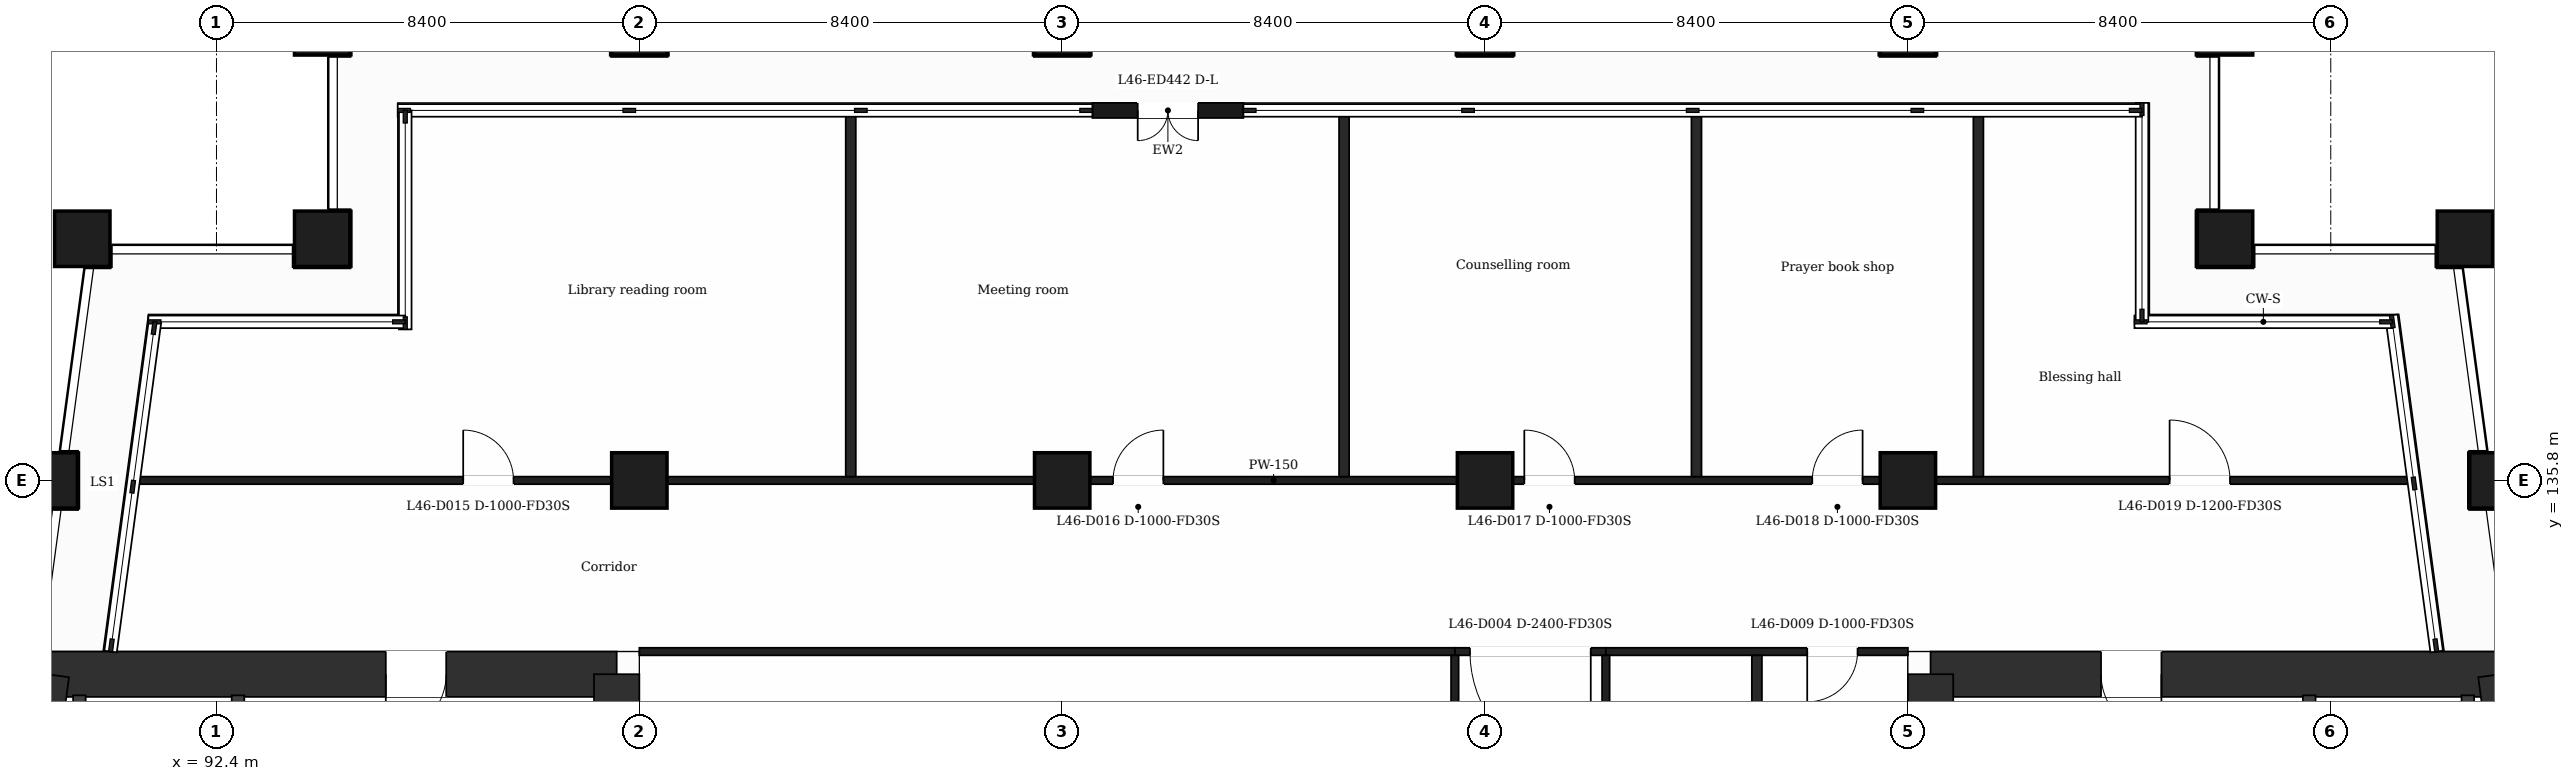
"""IFC4 building model, lengths in metres.
Left out: names, types, materials, properties, quantities, classifications, styles, units other than length and angle.
Written with IfcOpenShell. Run it as: python <this file> out.ifc"""

import sys

from ifc_helpers import new_model, si_unit, direction, frame, frame_2d, origin, origin_2d, place, context, subcontext, project, spatial, rectangle, extrude, element, fill, save


model = new_model("IFC4")
c1 = context("Model", 3, precision=1e-05, world=origin(), true_north=direction((0.0, 1.0)))
c2 = subcontext(c1, "Body", "Model", "MODEL_VIEW")
j1 = project(units=[si_unit("LENGTHUNIT", "METRE"), si_unit("PLANEANGLEUNIT", "RADIAN")], contexts=[c1])
p1 = place(None, origin())
s1 = spatial("IfcSite", under=j1, at=p1, CompositionType="ELEMENT")
p2 = place(p1, origin())
s2 = spatial("IfcBuilding", under=s1, at=p2, CompositionType="ELEMENT")
p3 = place(p2, frame((0.0, 0.0, 192.2)))
s3 = spatial("IfcBuildingStorey", under=s2, at=p3, CompositionType="ELEMENT", Elevation=192.2)
p4 = place(p3, frame((89.024, 131.95, 0.0), z_axis=(0.0, 0.0, 1.0), x_axis=(1.0, 0.0, 0.0)))
e1 = element("IfcWall", 1, at=p4, inside=s3, PredefinedType="SHEAR", context=c2, shape_type="SweptSolid", body=[
    extrude(rectangle(XDim=11.326, YDim=0.9, at=frame_2d((5.663, 0.0))), origin(), (0.0, 0.0, 1.0), 5.0),
])
p5 = place(p4, frame((6.739, 0.0, 0.0)))
e2 = element("IfcOpeningElement", 2, at=p5, cuts=e1, PredefinedType="OPENING", context=c2, shape_type="SweptSolid", body=[
    extrude(rectangle(XDim=1.2, YDim=2.1, at=frame_2d((0.6, 1.05))), frame((0.0, 0.46, 0.0), z_axis=(0.0, -1.0, 0.0), x_axis=(1.0, 0.0, 0.0)), (0.0, 0.0, 1.0), 0.92),
])
p6 = place(p3, frame((100.35, 131.95, 0.0), z_axis=(0.0, 0.0, 1.0), x_axis=(0.0, -1.0, 0.0)))
e3 = element("IfcWall", 3, at=p6, inside=s3, PredefinedType="SHEAR", context=c2, shape_type="SweptSolid", body=[
    extrude(rectangle(XDim=21.1, YDim=0.9, at=frame_2d((10.55, 0.0))), origin(), (0.0, 0.0, 1.0), 5.0),
])
p7 = place(p6, frame((7.8, 0.0, 0.0)))
e4 = element("IfcOpeningElement", 4, at=p7, cuts=e3, PredefinedType="OPENING", context=c2, shape_type="SweptSolid", body=[
    extrude(rectangle(XDim=1.4, YDim=2.1, at=frame_2d((0.7, 1.05))), frame((0.0, 0.46, 0.0), z_axis=(0.0, -1.0, 0.0), x_axis=(1.0, 0.0, 0.0)), (0.0, 0.0, 1.0), 0.92),
])
p8 = place(p3, frame((86.184, 110.85, 0.0), z_axis=(0.0, 0.0, 1.0), x_axis=(0.133410495943, 0.991060865725, 0.0)))
e5 = element("IfcWall", 5, at=p8, inside=s3, PredefinedType="SHEAR", context=c2, shape_type="SweptSolid", body=[
    extrude(rectangle(XDim=21.29, YDim=0.9, at=frame_2d((10.645, 0.0))), origin(), (0.0, 0.0, 1.0), 5.0),
])
p9 = place(p3, frame((126.45, 131.95, 0.0), z_axis=(0.0, 0.0, 1.0), x_axis=(1.0, 0.0, 0.0)))
e6 = element("IfcWall", 6, at=p9, inside=s3, PredefinedType="SHEAR", context=c2, shape_type="SweptSolid", body=[
    extrude(rectangle(XDim=11.326, YDim=0.9, at=frame_2d((5.663, 0.0))), origin(), (0.0, 0.0, 1.0), 5.0),
])
p10 = place(p9, frame((3.386, 0.0, 0.0)))
e7 = element("IfcOpeningElement", 7, at=p10, cuts=e6, PredefinedType="OPENING", context=c2, shape_type="SweptSolid", body=[
    extrude(rectangle(XDim=1.2, YDim=2.1, at=frame_2d((0.6, 1.05))), frame((0.0, 0.46, 0.0), z_axis=(0.0, -1.0, 0.0), x_axis=(1.0, 0.0, 0.0)), (0.0, 0.0, 1.0), 0.92),
])
p11 = place(p3, frame((137.776, 131.95, 0.0), z_axis=(0.0, 0.0, 1.0), x_axis=(0.133421759112, -0.991059349482, 0.0)))
e8 = element("IfcWall", 8, at=p11, inside=s3, PredefinedType="SHEAR", context=c2, shape_type="SweptSolid", body=[
    extrude(rectangle(XDim=21.29, YDim=0.9, at=frame_2d((10.645, 0.0))), origin(), (0.0, 0.0, 1.0), 5.0),
])
p12 = place(p3, frame((126.45, 110.85, 0.0), z_axis=(0.0, 0.0, 1.0), x_axis=(0.0, 1.0, 0.0)))
e9 = element("IfcWall", 9, at=p12, inside=s3, PredefinedType="SHEAR", context=c2, shape_type="SweptSolid", body=[
    extrude(rectangle(XDim=21.1, YDim=0.9, at=frame_2d((10.55, 0.0))), origin(), (0.0, 0.0, 1.0), 5.0),
])
p13 = place(p12, frame((11.9, 0.0, 0.0)))
e10 = element("IfcOpeningElement", 10, at=p13, cuts=e9, PredefinedType="OPENING", context=c2, shape_type="SweptSolid", body=[
    extrude(rectangle(XDim=1.4, YDim=2.1, at=frame_2d((0.7, 1.05))), frame((0.0, 0.46, 0.0), z_axis=(0.0, -1.0, 0.0), x_axis=(1.0, 0.0, 0.0)), (0.0, 0.0, 1.0), 0.92),
])
for number, where, z_axis, x_axis in (
    (11, (94.5, 140.6, 0.0), (0.0, 0.0, 1.0), (1.0, 0.0, 0.0)),
    (12, (132.3, 140.6, 0.0), (0.0, 0.0, 1.0), (1.0, 0.0, 0.0)),
    (13, (89.735, 140.6, 0.0), (0.0, 0.0, 1.0), (1.0, 0.0, 0.0)),
    (14, (137.065, 140.6, 0.0), (0.0, 0.0, 1.0), (1.0, 0.0, 0.0)),
    (15, (100.8, 135.8, 0.0), (0.0, 0.0, 1.0), (1.0, 0.0, 0.0)),
    (16, (109.2, 135.8, 0.0), (0.0, 0.0, 1.0), (1.0, 0.0, 0.0)),
    (17, (117.6, 135.8, 0.0), (0.0, 0.0, 1.0), (1.0, 0.0, 0.0)),
    (18, (126.0, 135.8, 0.0), (0.0, 0.0, 1.0), (1.0, 0.0, 0.0)),
    (19, (89.088, 135.8, 0.0), (0.0, 0.0, 1.0), (1.0, 0.0, 0.0)),
    (20, (137.711, 135.8, 0.0), (0.0, 0.0, 1.0), (1.0, 0.0, 0.0)),
    (21, (100.8, 144.8, 0.0), (0.0, 0.0, 1.0), (1.0, 0.0, 0.0)),
    (22, (109.2, 144.8, 0.0), (0.0, 0.0, 1.0), (1.0, 0.0, 0.0)),
    (23, (117.6, 144.8, 0.0), (0.0, 0.0, 1.0), (1.0, 0.0, 0.0)),
    (24, (126.0, 144.8, 0.0), (0.0, 0.0, 1.0), (1.0, 0.0, 0.0)),
    (25, (94.5, 144.8, 0.0), (0.0, 0.0, 1.0), (1.0, 0.0, 0.0)),
    (26, (132.3, 144.8, 0.0), (0.0, 0.0, 1.0), (1.0, 0.0, 0.0)),
):
    element("IfcColumn", number, at=place(p3, frame(where, z_axis=z_axis, x_axis=x_axis)), inside=s3, PredefinedType="COLUMN", context=c2, shape_type="SweptSolid", body=[
        extrude(rectangle(XDim=1.1, YDim=1.1, at=origin_2d()), origin(), (0.0, 0.0, 1.0), 5.0),
    ])
p14 = place(p3, frame((112.8, 143.15, 0.0), z_axis=(0.0, 0.0, 1.0), x_axis=(-1.0, 0.0, 0.0)))
e27 = element("IfcWall", 27, at=p14, inside=s3, PredefinedType="SOLIDWALL", context=c2, shape_type="SweptSolid", body=[
    extrude(rectangle(XDim=3.0, YDim=0.3, at=frame_2d((1.5, 0.0))), origin(), (0.0, 0.0, 1.0), 4.5),
])
p15 = place(p14, frame((0.9, 0.0, 0.0)))
e28 = element("IfcOpeningElement", 28, at=p15, cuts=e27, PredefinedType="OPENING", context=c2, shape_type="SweptSolid", body=[
    extrude(rectangle(XDim=1.2, YDim=2.4, at=frame_2d((0.6, 1.2))), frame((0.0, 0.16, 0.0), z_axis=(0.0, -1.0, 0.0), x_axis=(1.0, 0.0, 0.0)), (0.0, 0.0, 1.0), 0.32),
])
p16 = place(p3, frame((117.0, 132.4, 0.0), z_axis=(0.0, 0.0, 1.0), x_axis=(1.0, 0.0, 0.0)))
e29 = element("IfcWall", 29, at=p16, inside=s3, PredefinedType="PARTITIONING", context=c2, shape_type="SweptSolid", body=[
    extrude(rectangle(XDim=3.0, YDim=0.15, at=frame_2d((1.5, 0.0))), origin(), (0.0, 0.0, 1.0), 4.5),
])
p17 = place(p16, frame((0.3, 0.0, 0.0)))
e30 = element("IfcOpeningElement", 30, at=p17, cuts=e29, PredefinedType="OPENING", context=c2, shape_type="SweptSolid", body=[
    extrude(rectangle(XDim=2.4, YDim=2.1, at=frame_2d((1.2, 1.05))), frame((0.0, 0.085, 0.0), z_axis=(0.0, -1.0, 0.0), x_axis=(1.0, 0.0, 0.0)), (0.0, 0.0, 1.0), 0.17),
])
p18 = place(p3, frame((100.8, 132.4, 0.0), z_axis=(0.0, 0.0, 1.0), x_axis=(1.0, 0.0, 0.0)))
e31 = element("IfcWall", 31, at=p18, inside=s3, PredefinedType="PARTITIONING", context=c2, shape_type="SweptSolid", body=[
    extrude(rectangle(XDim=16.2, YDim=0.15, at=frame_2d((8.1, 0.0))), origin(), (0.0, 0.0, 1.0), 4.5),
])
p19 = place(p3, frame((120.0, 132.4, 0.0), z_axis=(0.0, 0.0, 1.0), x_axis=(1.0, 0.0, 0.0)))
e32 = element("IfcWall", 32, at=p19, inside=s3, PredefinedType="PARTITIONING", context=c2, shape_type="SweptSolid", body=[
    extrude(rectangle(XDim=6.0, YDim=0.15, at=frame_2d((3.0, 0.0))), origin(), (0.0, 0.0, 1.0), 4.5),
])
p20 = place(p19, frame((4.0, 0.0, 0.0)))
e33 = element("IfcOpeningElement", 33, at=p20, cuts=e32, PredefinedType="OPENING", context=c2, shape_type="SweptSolid", body=[
    extrude(rectangle(XDim=1.0, YDim=2.1, at=frame_2d((0.5, 1.05))), frame((0.0, 0.085, 0.0), z_axis=(0.0, -1.0, 0.0), x_axis=(1.0, 0.0, 0.0)), (0.0, 0.0, 1.0), 0.17),
])
p21 = place(p3, frame((90.864, 135.8, 0.0), z_axis=(0.0, 0.0, 1.0), x_axis=(1.0, 0.0, 0.0)))
e34 = element("IfcWall", 34, at=p21, inside=s3, PredefinedType="PARTITIONING", context=c2, shape_type="SweptSolid", body=[
    extrude(rectangle(XDim=45.072, YDim=0.15, at=frame_2d((22.536, 0.0))), origin(), (0.0, 0.0, 1.0), 4.5),
])
p22 = place(p21, frame((6.437, 0.0, 0.0)))
e35 = element("IfcOpeningElement", 35, at=p22, cuts=e34, PredefinedType="OPENING", context=c2, shape_type="SweptSolid", body=[
    extrude(rectangle(XDim=1.0, YDim=2.1, at=frame_2d((0.5, 1.05))), frame((0.0, 0.085, 0.0), z_axis=(0.0, -1.0, 0.0), x_axis=(1.0, 0.0, 0.0)), (0.0, 0.0, 1.0), 0.17),
])
p23 = place(p21, frame((19.346, 0.0, 0.0)))
e36 = element("IfcOpeningElement", 36, at=p23, cuts=e34, PredefinedType="OPENING", context=c2, shape_type="SweptSolid", body=[
    extrude(rectangle(XDim=1.0, YDim=2.1, at=frame_2d((0.5, 1.05))), frame((0.0, 0.085, 0.0), z_axis=(0.0, -1.0, 0.0), x_axis=(1.0, 0.0, 0.0)), (0.0, 0.0, 1.0), 0.17),
])
p24 = place(p21, frame((27.516, 0.0, 0.0)))
e37 = element("IfcOpeningElement", 37, at=p24, cuts=e34, PredefinedType="OPENING", context=c2, shape_type="SweptSolid", body=[
    extrude(rectangle(XDim=1.0, YDim=2.1, at=frame_2d((0.5, 1.05))), frame((0.0, 0.085, 0.0), z_axis=(0.0, -1.0, 0.0), x_axis=(1.0, 0.0, 0.0)), (0.0, 0.0, 1.0), 0.17),
])
p25 = place(p21, frame((33.236, 0.0, 0.0)))
e38 = element("IfcOpeningElement", 38, at=p25, cuts=e34, PredefinedType="OPENING", context=c2, shape_type="SweptSolid", body=[
    extrude(rectangle(XDim=1.0, YDim=2.1, at=frame_2d((0.5, 1.05))), frame((0.0, 0.085, 0.0), z_axis=(0.0, -1.0, 0.0), x_axis=(1.0, 0.0, 0.0)), (0.0, 0.0, 1.0), 0.17),
])
p26 = place(p21, frame((40.335, 0.0, 0.0)))
e39 = element("IfcOpeningElement", 39, at=p26, cuts=e34, PredefinedType="OPENING", context=c2, shape_type="SweptSolid", body=[
    extrude(rectangle(XDim=1.2, YDim=2.1, at=frame_2d((0.6, 1.05))), frame((0.0, 0.085, 0.0), z_axis=(0.0, -1.0, 0.0), x_axis=(1.0, 0.0, 0.0)), (0.0, 0.0, 1.0), 0.17),
])
p27 = place(p3, frame((89.677, 124.575, 0.0), z_axis=(0.0, 0.0, 1.0), x_axis=(0.0, 1.0, 0.0)))
e40 = element("IfcWall", 40, at=p27, inside=s3, PredefinedType="PARTITIONING", context=c2, shape_type="SweptSolid", body=[
    extrude(rectangle(XDim=6.955, YDim=0.25, at=frame_2d((3.478, 0.0))), origin(), (0.0, 0.0, 1.0), 4.5),
])
p28 = place(p3, frame((92.827, 124.575, 0.0), z_axis=(0.0, 0.0, 1.0), x_axis=(0.0, 1.0, 0.0)))
e41 = element("IfcWall", 41, at=p28, inside=s3, PredefinedType="PARTITIONING", context=c2, shape_type="SweptSolid", body=[
    extrude(rectangle(XDim=6.955, YDim=0.25, at=frame_2d((3.478, 0.0))), origin(), (0.0, 0.0, 1.0), 4.5),
])
p29 = place(p28, frame((5.325, 0.0, 0.0)))
e42 = element("IfcOpeningElement", 42, at=p29, cuts=e41, PredefinedType="OPENING", context=c2, shape_type="SweptSolid", body=[
    extrude(rectangle(XDim=1.0, YDim=2.1, at=frame_2d((0.5, 1.05))), frame((0.0, 0.135, 0.0), z_axis=(0.0, -1.0, 0.0), x_axis=(1.0, 0.0, 0.0)), (0.0, 0.0, 1.0), 0.27),
])
for number, where, z_axis, x_axis in (
    (43, (105.0, 135.875, 0.0), (0.0, 0.0, 1.0), (0.0, 1.0, 0.0)),
    (44, (114.8, 135.875, 0.0), (0.0, 0.0, 1.0), (0.0, 1.0, 0.0)),
):
    element("IfcWall", number, at=place(p3, frame(where, z_axis=z_axis, x_axis=x_axis)), inside=s3, PredefinedType="PARTITIONING", context=c2, shape_type="SweptSolid", body=[
        extrude(rectangle(XDim=7.165, YDim=0.2, at=frame_2d((3.583, 0.0))), origin(), (0.0, 0.0, 1.0), 4.5),
    ])
p30 = place(p3, frame((117.0, 125.875, 0.0), z_axis=(0.0, 0.0, 1.0), x_axis=(0.0, 1.0, 0.0)))
e45 = element("IfcWall", 45, at=p30, inside=s3, PredefinedType="PARTITIONING", context=c2, shape_type="SweptSolid", body=[
    extrude(rectangle(XDim=6.45, YDim=0.15, at=frame_2d((3.225, 0.0))), origin(), (0.0, 0.0, 1.0), 4.5),
])
p31 = place(p3, frame((120.0, 125.875, 0.0), z_axis=(0.0, 0.0, 1.0), x_axis=(0.0, 1.0, 0.0)))
e46 = element("IfcWall", 46, at=p31, inside=s3, PredefinedType="PARTITIONING", context=c2, shape_type="SweptSolid", body=[
    extrude(rectangle(XDim=6.45, YDim=0.15, at=frame_2d((3.225, 0.0))), origin(), (0.0, 0.0, 1.0), 4.5),
])
p32 = place(p31, frame((2.725, 0.0, 0.0)))
e47 = element("IfcOpeningElement", 47, at=p32, cuts=e46, PredefinedType="OPENING", context=c2, shape_type="SweptSolid", body=[
    extrude(rectangle(XDim=1.0, YDim=2.1, at=frame_2d((0.5, 1.05))), frame((0.0, 0.085, 0.0), z_axis=(0.0, -1.0, 0.0), x_axis=(1.0, 0.0, 0.0)), (0.0, 0.0, 1.0), 0.17),
])
p33 = place(p3, frame((121.8, 135.875, 0.0), z_axis=(0.0, 0.0, 1.0), x_axis=(0.0, 1.0, 0.0)))
e48 = element("IfcWall", 48, at=p33, inside=s3, PredefinedType="PARTITIONING", context=c2, shape_type="SweptSolid", body=[
    extrude(rectangle(XDim=7.165, YDim=0.2, at=frame_2d((3.583, 0.0))), origin(), (0.0, 0.0, 1.0), 4.5),
])
p34 = place(p3, frame((123.0, 125.9, 0.0), z_axis=(0.0, 0.0, 1.0), x_axis=(0.0, 1.0, 0.0)))
e49 = element("IfcWall", 49, at=p34, inside=s3, PredefinedType="PARTITIONING", context=c2, shape_type="SweptSolid", body=[
    extrude(rectangle(XDim=6.425, YDim=0.2, at=frame_2d((3.212, 0.0))), origin(), (0.0, 0.0, 1.0), 4.5),
])
p35 = place(p3, frame((127.4, 135.875, 0.0), z_axis=(0.0, 0.0, 1.0), x_axis=(0.0, 1.0, 0.0)))
e50 = element("IfcWall", 50, at=p35, inside=s3, PredefinedType="PARTITIONING", context=c2, shape_type="SweptSolid", body=[
    extrude(rectangle(XDim=7.165, YDim=0.2, at=frame_2d((3.583, 0.0))), origin(), (0.0, 0.0, 1.0), 4.5),
])
p36 = place(p3, frame((133.973, 124.575, 0.0), z_axis=(0.0, 0.0, 1.0), x_axis=(0.0, 1.0, 0.0)))
e51 = element("IfcWall", 51, at=p36, inside=s3, PredefinedType="PARTITIONING", context=c2, shape_type="SweptSolid", body=[
    extrude(rectangle(XDim=6.955, YDim=0.25, at=frame_2d((3.478, 0.0))), origin(), (0.0, 0.0, 1.0), 4.5),
])
p37 = place(p36, frame((5.325, 0.0, 0.0)))
e52 = element("IfcOpeningElement", 52, at=p37, cuts=e51, PredefinedType="OPENING", context=c2, shape_type="SweptSolid", body=[
    extrude(rectangle(XDim=1.0, YDim=2.1, at=frame_2d((0.5, 1.05))), frame((0.0, 0.135, 0.0), z_axis=(0.0, -1.0, 0.0), x_axis=(1.0, 0.0, 0.0)), (0.0, 0.0, 1.0), 0.27),
])
p38 = place(p3, frame((137.123, 124.575, 0.0), z_axis=(0.0, 0.0, 1.0), x_axis=(0.0, 1.0, 0.0)))
e53 = element("IfcWall", 53, at=p38, inside=s3, PredefinedType="PARTITIONING", context=c2, shape_type="SweptSolid", body=[
    extrude(rectangle(XDim=6.955, YDim=0.25, at=frame_2d((3.478, 0.0))), origin(), (0.0, 0.0, 1.0), 4.5),
])
p39 = place(p15, origin())
e54 = element("IfcDoor", 54, at=p39, inside=s3, OperationType="DOUBLE_DOOR_SINGLE_SWING", PredefinedType="DOOR", context=c2, shape_type="SweptSolid", body=[
    extrude(rectangle(XDim=1.2, YDim=2.4, at=frame_2d((0.6, 1.2))), frame((0.0, 0.025, 0.0), z_axis=(0.0, -1.0, 0.0), x_axis=(1.0, 0.0, 0.0)), (0.0, 0.0, 1.0), 0.05),
])
fill(e28, e54)
p40 = place(p17, origin())
e55 = element("IfcDoor", 55, at=p40, inside=s3, OperationType="SINGLE_SWING_RIGHT", PredefinedType="DOOR", context=c2, shape_type="SweptSolid", body=[
    extrude(rectangle(XDim=2.4, YDim=2.1, at=frame_2d((1.2, 1.05))), frame((0.0, 0.025, 0.0), z_axis=(0.0, -1.0, 0.0), x_axis=(1.0, 0.0, 0.0)), (0.0, 0.0, 1.0), 0.05),
])
fill(e30, e55)
p41 = place(p20, origin())
e56 = element("IfcDoor", 56, at=p41, inside=s3, OperationType="SINGLE_SWING_LEFT", PredefinedType="DOOR", context=c2, shape_type="SweptSolid", body=[
    extrude(rectangle(XDim=1.0, YDim=2.1, at=frame_2d((0.5, 1.05))), frame((0.0, 0.025, 0.0), z_axis=(0.0, -1.0, 0.0), x_axis=(1.0, 0.0, 0.0)), (0.0, 0.0, 1.0), 0.05),
])
fill(e33, e56)
p42 = place(p22, origin())
e57 = element("IfcDoor", 57, at=p42, inside=s3, OperationType="SINGLE_SWING_LEFT", PredefinedType="DOOR", context=c2, shape_type="SweptSolid", body=[
    extrude(rectangle(XDim=1.0, YDim=2.1, at=frame_2d((0.5, 1.05))), frame((0.0, 0.025, 0.0), z_axis=(0.0, -1.0, 0.0), x_axis=(1.0, 0.0, 0.0)), (0.0, 0.0, 1.0), 0.05),
])
fill(e35, e57)
p43 = place(p23, origin())
e58 = element("IfcDoor", 58, at=p43, inside=s3, OperationType="SINGLE_SWING_RIGHT", PredefinedType="DOOR", context=c2, shape_type="SweptSolid", body=[
    extrude(rectangle(XDim=1.0, YDim=2.1, at=frame_2d((0.5, 1.05))), frame((0.0, 0.025, 0.0), z_axis=(0.0, -1.0, 0.0), x_axis=(1.0, 0.0, 0.0)), (0.0, 0.0, 1.0), 0.05),
])
fill(e36, e58)
p44 = place(p24, origin())
e59 = element("IfcDoor", 59, at=p44, inside=s3, OperationType="SINGLE_SWING_LEFT", PredefinedType="DOOR", context=c2, shape_type="SweptSolid", body=[
    extrude(rectangle(XDim=1.0, YDim=2.1, at=frame_2d((0.5, 1.05))), frame((0.0, 0.025, 0.0), z_axis=(0.0, -1.0, 0.0), x_axis=(1.0, 0.0, 0.0)), (0.0, 0.0, 1.0), 0.05),
])
fill(e37, e59)
p45 = place(p25, origin())
e60 = element("IfcDoor", 60, at=p45, inside=s3, OperationType="SINGLE_SWING_RIGHT", PredefinedType="DOOR", context=c2, shape_type="SweptSolid", body=[
    extrude(rectangle(XDim=1.0, YDim=2.1, at=frame_2d((0.5, 1.05))), frame((0.0, 0.025, 0.0), z_axis=(0.0, -1.0, 0.0), x_axis=(1.0, 0.0, 0.0)), (0.0, 0.0, 1.0), 0.05),
])
fill(e38, e60)
p46 = place(p26, origin())
e61 = element("IfcDoor", 61, at=p46, inside=s3, OperationType="SINGLE_SWING_LEFT", PredefinedType="DOOR", context=c2, shape_type="SweptSolid", body=[
    extrude(rectangle(XDim=1.2, YDim=2.1, at=frame_2d((0.6, 1.05))), frame((0.0, 0.025, 0.0), z_axis=(0.0, -1.0, 0.0), x_axis=(1.0, 0.0, 0.0)), (0.0, 0.0, 1.0), 0.05),
])
fill(e39, e61)
p47 = place(p5, origin())
e62 = element("IfcDoor", 62, at=p47, inside=s3, OperationType="SINGLE_SWING_LEFT", PredefinedType="DOOR", context=c2, shape_type="SweptSolid", body=[
    extrude(rectangle(XDim=1.2, YDim=2.1, at=frame_2d((0.6, 1.05))), frame((0.0, 0.025, 0.0), z_axis=(0.0, -1.0, 0.0), x_axis=(1.0, 0.0, 0.0)), (0.0, 0.0, 1.0), 0.05),
])
fill(e2, e62)
p48 = place(p10, origin())
e63 = element("IfcDoor", 63, at=p48, inside=s3, OperationType="SINGLE_SWING_RIGHT", PredefinedType="DOOR", context=c2, shape_type="SweptSolid", body=[
    extrude(rectangle(XDim=1.2, YDim=2.1, at=frame_2d((0.6, 1.05))), frame((0.0, 0.025, 0.0), z_axis=(0.0, -1.0, 0.0), x_axis=(1.0, 0.0, 0.0)), (0.0, 0.0, 1.0), 0.05),
])
fill(e7, e63)
save(model, sys.argv[1])
